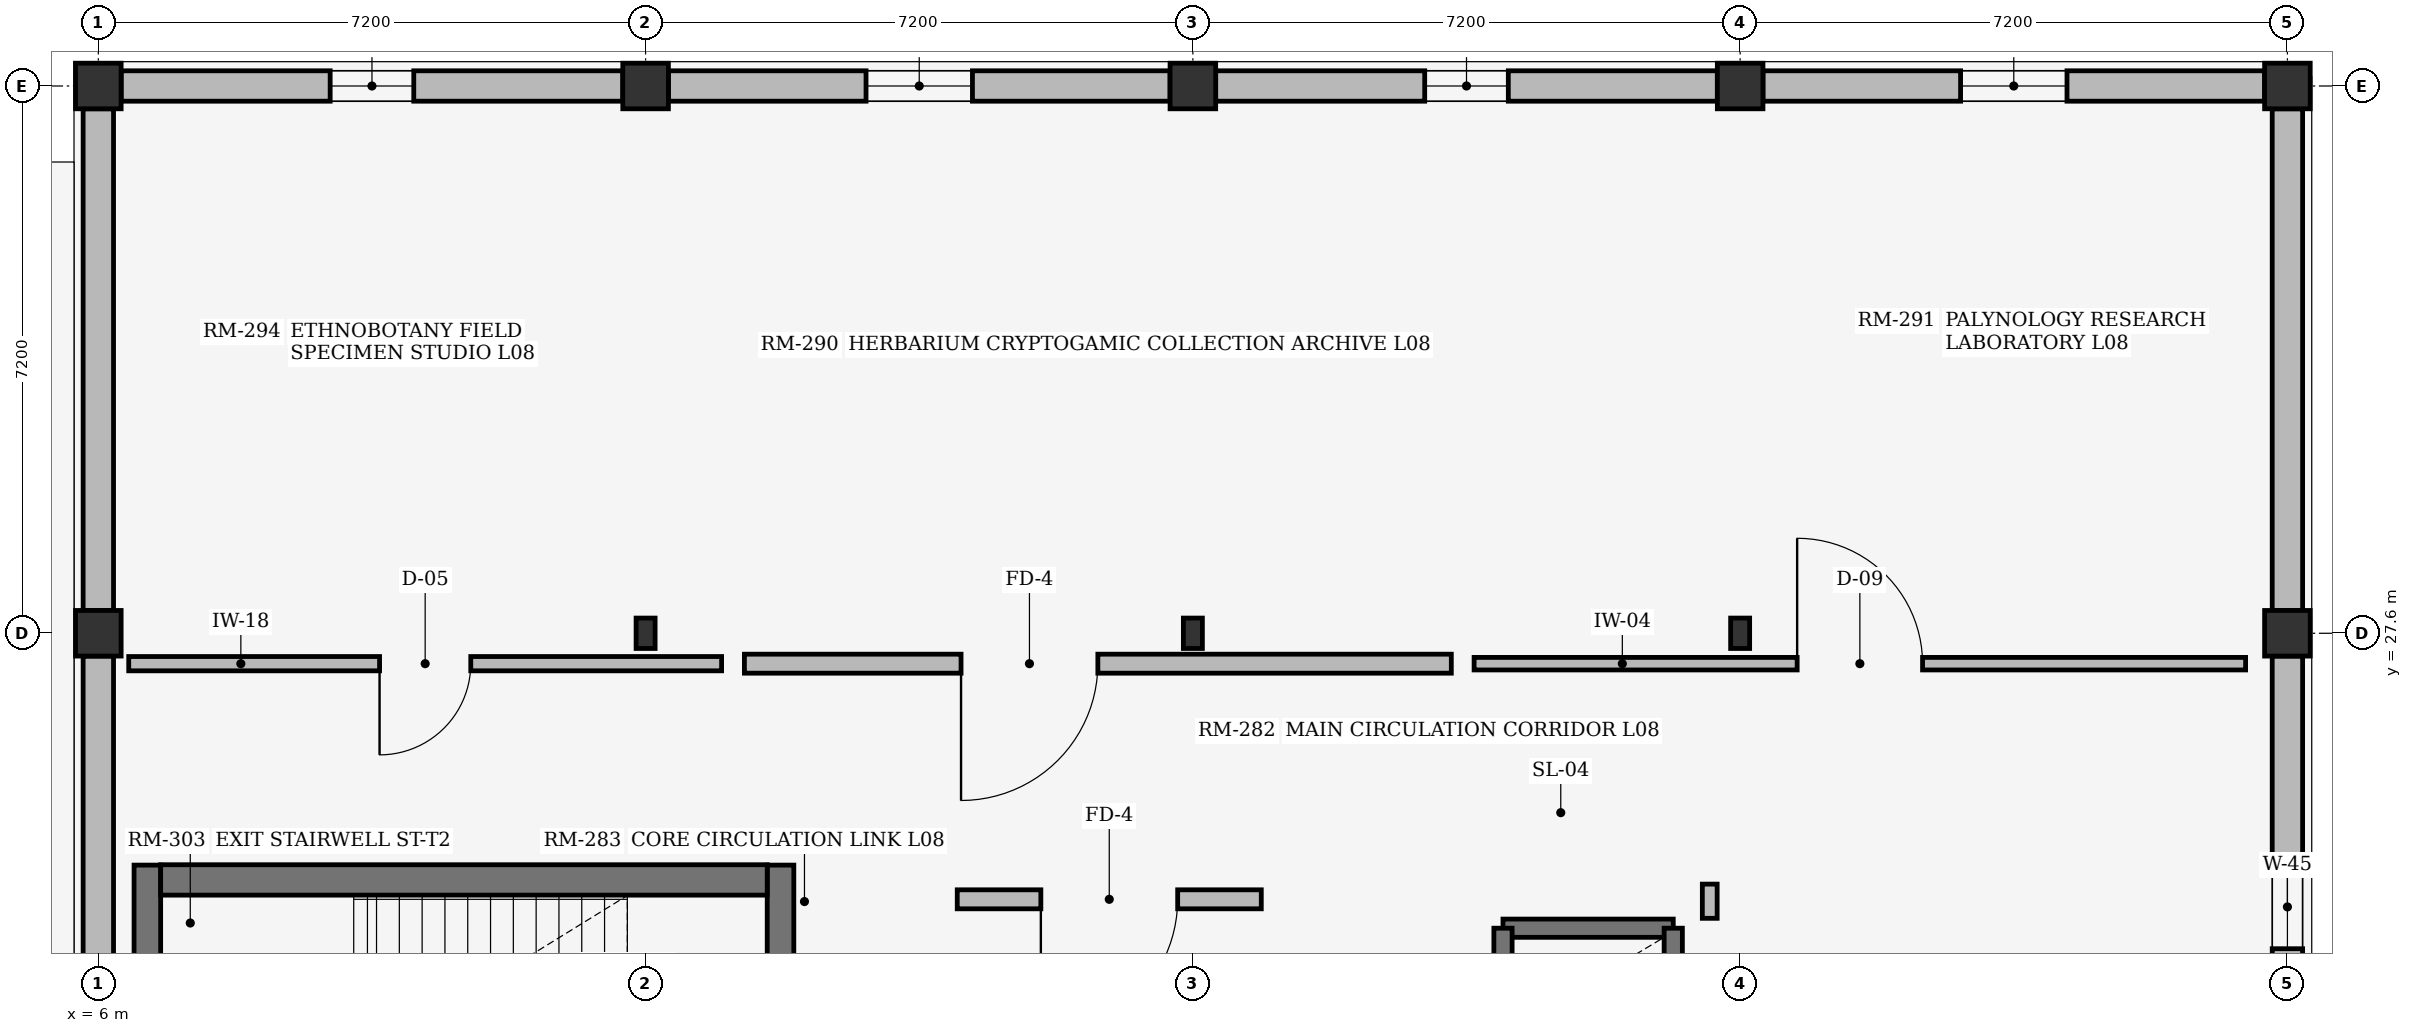
"""IFC4 building model, lengths in metres.
Left out: names, types, materials, properties, quantities, classifications, styles, units other than length and angle.
Written with IfcOpenShell. Run it as: python <this file> out.ifc"""

import sys

from ifc_helpers import new_model, si_unit, direction, frame, frame_2d, origin, origin_2d, place, context, subcontext, project, spatial, rectangle, i_section, extrude, element, fill, save


model = new_model("IFC4")
c1 = context("Model", 3, precision=1e-05, world=origin(), true_north=direction((0.0, 1.0)))
c2 = subcontext(c1, "Body", "Model", "MODEL_VIEW")
j1 = project(units=[si_unit("LENGTHUNIT", "METRE"), si_unit("PLANEANGLEUNIT", "RADIAN")], contexts=[c1])
p1 = place(None, origin())
s1 = spatial("IfcSite", under=j1, at=p1, CompositionType="ELEMENT")
p2 = place(p1, origin())
s2 = spatial("IfcBuilding", under=s1, at=p2, CompositionType="ELEMENT")
p3 = place(p2, frame((0.0, 0.0, 32.7)))
s3 = spatial("IfcBuildingStorey", under=s2, at=p3, CompositionType="ELEMENT", Elevation=32.7)
for number, where, z_axis, x_axis in (
    (1, (6.0, 27.6, 0.0), (0.0, 0.0, 1.0), (1.0, 0.0, 0.0)),
    (2, (6.0, 34.8, 0.0), (0.0, 0.0, 1.0), (1.0, 0.0, 0.0)),
):
    element("IfcColumn", number, at=place(p3, frame(where, z_axis=z_axis, x_axis=x_axis)), inside=s3, PredefinedType="COLUMN", context=c2, shape_type="SweptSolid", body=[
        extrude(rectangle(XDim=0.6, YDim=0.6, at=origin_2d()), origin(), (0.0, 0.0, 1.0), 3.56),
    ])
p4 = place(p3, frame((13.2, 27.6, 0.0), z_axis=(0.0, 0.0, 1.0), x_axis=(1.0, 0.0, 0.0)))
e3 = element("IfcColumn", 3, at=p4, inside=s3, PredefinedType="COLUMN", context=c2, shape_type="SweptSolid", body=[
    extrude(i_section(OverallWidth=0.25, OverallDepth=0.4, WebThickness=0.01, FlangeThickness=0.013, at=origin_2d()), origin(), (0.0, 0.0, 1.0), 3.56),
])
p5 = place(p3, frame((13.2, 34.8, 0.0), z_axis=(0.0, 0.0, 1.0), x_axis=(1.0, 0.0, 0.0)))
e4 = element("IfcColumn", 4, at=p5, inside=s3, PredefinedType="COLUMN", context=c2, shape_type="SweptSolid", body=[
    extrude(rectangle(XDim=0.6, YDim=0.6, at=origin_2d()), origin(), (0.0, 0.0, 1.0), 3.56),
])
p6 = place(p3, frame((20.4, 27.6, 0.0), z_axis=(0.0, 0.0, 1.0), x_axis=(1.0, 0.0, 0.0)))
e5 = element("IfcColumn", 5, at=p6, inside=s3, PredefinedType="COLUMN", context=c2, shape_type="SweptSolid", body=[
    extrude(i_section(OverallWidth=0.25, OverallDepth=0.4, WebThickness=0.01, FlangeThickness=0.013, at=origin_2d()), origin(), (0.0, 0.0, 1.0), 3.56),
])
p7 = place(p3, frame((20.4, 34.8, 0.0), z_axis=(0.0, 0.0, 1.0), x_axis=(1.0, 0.0, 0.0)))
e6 = element("IfcColumn", 6, at=p7, inside=s3, PredefinedType="COLUMN", context=c2, shape_type="SweptSolid", body=[
    extrude(rectangle(XDim=0.6, YDim=0.6, at=origin_2d()), origin(), (0.0, 0.0, 1.0), 3.56),
])
p8 = place(p3, frame((27.6, 27.6, 0.0), z_axis=(0.0, 0.0, 1.0), x_axis=(1.0, 0.0, 0.0)))
e7 = element("IfcColumn", 7, at=p8, inside=s3, PredefinedType="COLUMN", context=c2, shape_type="SweptSolid", body=[
    extrude(i_section(OverallWidth=0.25, OverallDepth=0.4, WebThickness=0.01, FlangeThickness=0.013, at=origin_2d()), origin(), (0.0, 0.0, 1.0), 3.56),
])
for number, where, z_axis, x_axis in (
    (8, (27.6, 34.8, 0.0), (0.0, 0.0, 1.0), (1.0, 0.0, 0.0)),
    (9, (34.8, 27.6, 0.0), (0.0, 0.0, 1.0), (1.0, 0.0, 0.0)),
    (10, (34.8, 34.8, 0.0), (0.0, 0.0, 1.0), (1.0, 0.0, 0.0)),
):
    element("IfcColumn", number, at=place(p3, frame(where, z_axis=z_axis, x_axis=x_axis)), inside=s3, PredefinedType="COLUMN", context=c2, shape_type="SweptSolid", body=[
        extrude(rectangle(XDim=0.6, YDim=0.6, at=origin_2d()), origin(), (0.0, 0.0, 1.0), 3.56),
    ])
p9 = place(p3, frame((6.3, 34.8, 0.0), z_axis=(0.0, 0.0, 1.0), x_axis=(1.0, 0.0, 0.0)))
e11 = element("IfcWall", 11, at=p9, inside=s3, PredefinedType="STANDARD", context=c2, shape_type="SweptSolid", body=[
    extrude(rectangle(XDim=6.6, YDim=0.4, at=frame_2d((3.3, 0.0))), origin(), (0.0, 0.0, 1.0), 3.04),
])
p10 = place(p9, frame((2.75, 0.0, 0.75)))
e12 = element("IfcOpeningElement", 12, at=p10, cuts=e11, PredefinedType="OPENING", context=c2, shape_type="SweptSolid", body=[
    extrude(rectangle(XDim=1.1, YDim=1.25, at=frame_2d((0.55, 0.625))), frame((0.0, 0.21, 0.0), z_axis=(0.0, -1.0, 0.0), x_axis=(1.0, 0.0, 0.0)), (0.0, 0.0, 1.0), 0.42),
])
p11 = place(p3, frame((13.5, 34.8, 0.0), z_axis=(0.0, 0.0, 1.0), x_axis=(1.0, 0.0, 0.0)))
e13 = element("IfcWall", 13, at=p11, inside=s3, PredefinedType="STANDARD", context=c2, shape_type="SweptSolid", body=[
    extrude(rectangle(XDim=6.6, YDim=0.4, at=frame_2d((3.3, 0.0))), origin(), (0.0, 0.0, 1.0), 3.04),
])
p12 = place(p11, frame((2.6, 0.0, 0.75)))
e14 = element("IfcOpeningElement", 14, at=p12, cuts=e13, PredefinedType="OPENING", context=c2, shape_type="SweptSolid", body=[
    extrude(rectangle(XDim=1.4, YDim=1.25, at=frame_2d((0.7, 0.625))), frame((0.0, 0.21, 0.0), z_axis=(0.0, -1.0, 0.0), x_axis=(1.0, 0.0, 0.0)), (0.0, 0.0, 1.0), 0.42),
])
p13 = place(p3, frame((20.7, 34.8, 0.0), z_axis=(0.0, 0.0, 1.0), x_axis=(1.0, 0.0, 0.0)))
e15 = element("IfcWall", 15, at=p13, inside=s3, PredefinedType="STANDARD", context=c2, shape_type="SweptSolid", body=[
    extrude(rectangle(XDim=6.6, YDim=0.4, at=frame_2d((3.3, 0.0))), origin(), (0.0, 0.0, 1.0), 3.04),
])
p14 = place(p13, frame((2.75, 0.0, 0.75)))
e16 = element("IfcOpeningElement", 16, at=p14, cuts=e15, PredefinedType="OPENING", context=c2, shape_type="SweptSolid", body=[
    extrude(rectangle(XDim=1.1, YDim=1.25, at=frame_2d((0.55, 0.625))), frame((0.0, 0.21, 0.0), z_axis=(0.0, -1.0, 0.0), x_axis=(1.0, 0.0, 0.0)), (0.0, 0.0, 1.0), 0.42),
])
p15 = place(p3, frame((27.9, 34.8, 0.0), z_axis=(0.0, 0.0, 1.0), x_axis=(1.0, 0.0, 0.0)))
e17 = element("IfcWall", 17, at=p15, inside=s3, PredefinedType="STANDARD", context=c2, shape_type="SweptSolid", body=[
    extrude(rectangle(XDim=6.6, YDim=0.4, at=frame_2d((3.3, 0.0))), origin(), (0.0, 0.0, 1.0), 3.04),
])
p16 = place(p15, frame((2.6, 0.0, 0.75)))
e18 = element("IfcOpeningElement", 18, at=p16, cuts=e17, PredefinedType="OPENING", context=c2, shape_type="SweptSolid", body=[
    extrude(rectangle(XDim=1.4, YDim=1.25, at=frame_2d((0.7, 0.625))), frame((0.0, 0.21, 0.0), z_axis=(0.0, -1.0, 0.0), x_axis=(1.0, 0.0, 0.0)), (0.0, 0.0, 1.0), 0.42),
])
for number, where, z_axis, x_axis in (
    (19, (6.0, 20.7, 0.0), (0.0, 0.0, 1.0), (0.0, 1.0, 0.0)),
    (20, (6.0, 27.9, 0.0), (0.0, 0.0, 1.0), (0.0, 1.0, 0.0)),
):
    element("IfcWall", number, at=place(p3, frame(where, z_axis=z_axis, x_axis=x_axis)), inside=s3, PredefinedType="STANDARD", context=c2, shape_type="SweptSolid", body=[
        extrude(rectangle(XDim=6.6, YDim=0.4, at=frame_2d((3.3, 0.0))), origin(), (0.0, 0.0, 1.0), 3.04),
    ])
p17 = place(p3, frame((34.8, 20.7, 0.0), z_axis=(0.0, 0.0, 1.0), x_axis=(0.0, 1.0, 0.0)))
e21 = element("IfcWall", 21, at=p17, inside=s3, PredefinedType="STANDARD", context=c2, shape_type="SweptSolid", body=[
    extrude(rectangle(XDim=6.6, YDim=0.4, at=frame_2d((3.3, 0.0))), origin(), (0.0, 0.0, 1.0), 3.04),
])
p18 = place(p17, frame((2.75, 0.0, 0.75)))
e22 = element("IfcOpeningElement", 22, at=p18, cuts=e21, PredefinedType="OPENING", context=c2, shape_type="SweptSolid", body=[
    extrude(rectangle(XDim=1.1, YDim=1.25, at=frame_2d((0.55, 0.625))), frame((0.0, 0.21, 0.0), z_axis=(0.0, -1.0, 0.0), x_axis=(1.0, 0.0, 0.0)), (0.0, 0.0, 1.0), 0.42),
])
p19 = place(p3, frame((34.8, 27.9, 0.0), z_axis=(0.0, 0.0, 1.0), x_axis=(0.0, 1.0, 0.0)))
e23 = element("IfcWall", 23, at=p19, inside=s3, PredefinedType="STANDARD", context=c2, shape_type="SweptSolid", body=[
    extrude(rectangle(XDim=6.6, YDim=0.4, at=frame_2d((3.3, 0.0))), origin(), (0.0, 0.0, 1.0), 3.04),
])
p20 = place(p3, frame((14.975, 24.55, 0.0), z_axis=(0.0, 0.0, 1.0), x_axis=(0.0, -1.0, 0.0)))
e24 = element("IfcWall", 24, at=p20, inside=s3, PredefinedType="SHEAR", context=c2, shape_type="SweptSolid", body=[
    extrude(rectangle(XDim=4.59, YDim=0.35, at=frame_2d((2.295, 0.0))), origin(), (0.0, 0.0, 1.0), 3.56),
])
p21 = place(p20, frame((1.72, 0.0, 0.0)))
e25 = element("IfcOpeningElement", 25, at=p21, cuts=e24, PredefinedType="OPENING", context=c2, shape_type="SweptSolid", body=[
    extrude(rectangle(XDim=1.15, YDim=2.2, at=frame_2d((0.575, 1.1))), frame((0.0, 0.185, 0.0), z_axis=(0.0, -1.0, 0.0), x_axis=(1.0, 0.0, 0.0)), (0.0, 0.0, 1.0), 0.37),
])
p22 = place(p3, frame((6.645, 24.55, 0.0), z_axis=(0.0, 0.0, 1.0), x_axis=(0.0, -1.0, 0.0)))
e26 = element("IfcWall", 26, at=p22, inside=s3, PredefinedType="SHEAR", context=c2, shape_type="SweptSolid", body=[
    extrude(rectangle(XDim=4.59, YDim=0.35, at=frame_2d((2.295, 0.0))), origin(), (0.0, 0.0, 1.0), 3.56),
])
p23 = place(p3, frame((14.8, 24.355, 0.0), z_axis=(0.0, 0.0, 1.0), x_axis=(-1.0, 0.0, 0.0)))
e27 = element("IfcWall", 27, at=p23, inside=s3, PredefinedType="SHEAR", context=c2, shape_type="SweptSolid", body=[
    extrude(rectangle(XDim=7.98, YDim=0.4, at=frame_2d((3.99, 0.0))), origin(), (0.0, 0.0, 1.0), 3.56),
])
p24 = place(p3, frame((24.48, 23.72, 0.0), z_axis=(0.0, 0.0, 1.0), x_axis=(1.0, 0.0, 0.0)))
e28 = element("IfcWall", 28, at=p24, inside=s3, PredefinedType="SHEAR", context=c2, shape_type="SweptSolid", body=[
    extrude(rectangle(XDim=2.24, YDim=0.24, at=frame_2d((1.12, 0.0))), origin(), (0.0, 0.0, 1.0), 3.56),
])
for number, where, z_axis, x_axis in (
    (29, (24.48, 20.78, 0.0), (0.0, 0.0, 1.0), (0.0, 1.0, 0.0)),
    (30, (26.72, 20.78, 0.0), (0.0, 0.0, 1.0), (0.0, 1.0, 0.0)),
):
    element("IfcWall", number, at=place(p3, frame(where, z_axis=z_axis, x_axis=x_axis)), inside=s3, PredefinedType="SHEAR", context=c2, shape_type="SweptSolid", body=[
        extrude(rectangle(XDim=2.94, YDim=0.24, at=frame_2d((1.47, 0.0))), origin(), (0.0, 0.0, 1.0), 3.56),
    ])
p25 = place(p3, frame((17.3, 24.1, 0.0), z_axis=(0.0, 0.0, 1.0), x_axis=(1.0, 0.0, 0.0)))
e31 = element("IfcWall", 31, at=p25, inside=s3, PredefinedType="SOLIDWALL", context=c2, shape_type="SweptSolid", body=[
    extrude(rectangle(XDim=4.0, YDim=0.25, at=frame_2d((2.0, 0.0))), origin(), (0.0, 0.0, 1.0), 3.54),
])
p26 = place(p25, frame((1.1, 0.0, 0.0)))
e32 = element("IfcOpeningElement", 32, at=p26, cuts=e31, PredefinedType="OPENING", context=c2, shape_type="SweptSolid", body=[
    extrude(rectangle(XDim=1.8, YDim=2.25, at=frame_2d((0.9, 1.125))), frame((0.0, 0.135, 0.0), z_axis=(0.0, -1.0, 0.0), x_axis=(1.0, 0.0, 0.0)), (0.0, 0.0, 1.0), 0.27),
])
p27 = place(p3, frame((6.4, 27.2, 0.0), z_axis=(0.0, 0.0, 1.0), x_axis=(1.0, 0.0, 0.0)))
e33 = element("IfcWall", 33, at=p27, inside=s3, PredefinedType="PARTITIONING", context=c2, shape_type="SweptSolid", body=[
    extrude(rectangle(XDim=7.8, YDim=0.188, at=frame_2d((3.9, 0.0))), origin(), (0.0, 0.0, 1.0), 3.54),
])
p28 = place(p27, frame((3.3, 0.0, 0.0)))
e34 = element("IfcOpeningElement", 34, at=p28, cuts=e33, PredefinedType="OPENING", context=c2, shape_type="SweptSolid", body=[
    extrude(rectangle(XDim=1.2, YDim=2.2, at=frame_2d((0.6, 1.1))), frame((0.0, 0.104, 0.0), z_axis=(0.0, -1.0, 0.0), x_axis=(1.0, 0.0, 0.0)), (0.0, 0.0, 1.0), 0.208),
])
p29 = place(p3, frame((27.2, 24.3, 0.0), z_axis=(0.0, 0.0, 1.0), x_axis=(0.0, -1.0, 0.0)))
e35 = element("IfcWall", 35, at=p29, inside=s3, PredefinedType="PARTITIONING", context=c2, shape_type="SweptSolid", body=[
    extrude(rectangle(XDim=0.45, YDim=0.195, at=frame_2d((0.225, 0.0))), origin(), (0.0, 0.0, 1.0), 3.54),
])
p30 = place(p3, frame((14.5, 27.2, 0.0), z_axis=(0.0, 0.0, 1.0), x_axis=(1.0, 0.0, 0.0)))
e36 = element("IfcWall", 36, at=p30, inside=s3, PredefinedType="SOLIDWALL", context=c2, shape_type="SweptSolid", body=[
    extrude(rectangle(XDim=9.3, YDim=0.25, at=frame_2d((4.65, 0.0))), origin(), (0.0, 0.0, 1.0), 3.54),
])
p31 = place(p30, frame((2.85, 0.0, 0.0)))
e37 = element("IfcOpeningElement", 37, at=p31, cuts=e36, PredefinedType="OPENING", context=c2, shape_type="SweptSolid", body=[
    extrude(rectangle(XDim=1.8, YDim=2.25, at=frame_2d((0.9, 1.125))), frame((0.0, 0.135, 0.0), z_axis=(0.0, -1.0, 0.0), x_axis=(1.0, 0.0, 0.0)), (0.0, 0.0, 1.0), 0.27),
])
p32 = place(p3, frame((24.1, 27.2, 0.0), z_axis=(0.0, 0.0, 1.0), x_axis=(1.0, 0.0, 0.0)))
e38 = element("IfcWall", 38, at=p32, inside=s3, PredefinedType="PARTITIONING", context=c2, shape_type="SweptSolid", body=[
    extrude(rectangle(XDim=10.15, YDim=0.165, at=frame_2d((5.075, 0.0))), origin(), (0.0, 0.0, 1.0), 3.54),
])
p33 = place(p32, frame((4.25, 0.0, 0.0)))
e39 = element("IfcOpeningElement", 39, at=p33, cuts=e38, PredefinedType="OPENING", context=c2, shape_type="SweptSolid", body=[
    extrude(rectangle(XDim=1.65, YDim=2.25, at=frame_2d((0.825, 1.125))), frame((0.0, 0.093, 0.0), z_axis=(0.0, -1.0, 0.0), x_axis=(1.0, 0.0, 0.0)), (0.0, 0.0, 1.0), 0.185),
])
p34 = place(p10, origin())
e40 = element("IfcWindow", 40, at=p34, inside=s3, PartitioningType="SINGLE_PANEL", PredefinedType="WINDOW", context=c2, shape_type="SweptSolid", body=[
    extrude(rectangle(XDim=1.1, YDim=1.25, at=frame_2d((0.55, 0.625))), frame((0.0, 0.03, 0.0), z_axis=(0.0, -1.0, 0.0), x_axis=(1.0, 0.0, 0.0)), (0.0, 0.0, 1.0), 0.06),
])
fill(e12, e40)
p35 = place(p12, origin())
e41 = element("IfcWindow", 41, at=p35, inside=s3, PartitioningType="SINGLE_PANEL", PredefinedType="WINDOW", context=c2, shape_type="SweptSolid", body=[
    extrude(rectangle(XDim=1.4, YDim=1.25, at=frame_2d((0.7, 0.625))), frame((0.0, 0.03, 0.0), z_axis=(0.0, -1.0, 0.0), x_axis=(1.0, 0.0, 0.0)), (0.0, 0.0, 1.0), 0.06),
])
fill(e14, e41)
p36 = place(p14, origin())
e42 = element("IfcWindow", 42, at=p36, inside=s3, PartitioningType="SINGLE_PANEL", PredefinedType="WINDOW", context=c2, shape_type="SweptSolid", body=[
    extrude(rectangle(XDim=1.1, YDim=1.25, at=frame_2d((0.55, 0.625))), frame((0.0, 0.03, 0.0), z_axis=(0.0, -1.0, 0.0), x_axis=(1.0, 0.0, 0.0)), (0.0, 0.0, 1.0), 0.06),
])
fill(e16, e42)
p37 = place(p16, origin())
e43 = element("IfcWindow", 43, at=p37, inside=s3, PartitioningType="SINGLE_PANEL", PredefinedType="WINDOW", context=c2, shape_type="SweptSolid", body=[
    extrude(rectangle(XDim=1.4, YDim=1.25, at=frame_2d((0.7, 0.625))), frame((0.0, 0.03, 0.0), z_axis=(0.0, -1.0, 0.0), x_axis=(1.0, 0.0, 0.0)), (0.0, 0.0, 1.0), 0.06),
])
fill(e18, e43)
p38 = place(p18, origin())
e44 = element("IfcWindow", 44, at=p38, inside=s3, PartitioningType="SINGLE_PANEL", PredefinedType="WINDOW", context=c2, shape_type="SweptSolid", body=[
    extrude(rectangle(XDim=1.1, YDim=1.25, at=frame_2d((0.55, 0.625))), frame((0.0, 0.03, 0.0), z_axis=(0.0, -1.0, 0.0), x_axis=(1.0, 0.0, 0.0)), (0.0, 0.0, 1.0), 0.06),
])
fill(e22, e44)
p39 = place(p26, frame((1.8, 0.0, 0.0), z_axis=(0.0, 0.0, 1.0), x_axis=(-1.0, 0.0, 0.0)))
e45 = element("IfcDoor", 45, at=p39, inside=s3, OperationType="DOUBLE_DOOR_SINGLE_SWING", PredefinedType="DOOR", context=c2, shape_type="SweptSolid", body=[
    extrude(rectangle(XDim=1.8, YDim=2.25, at=frame_2d((0.9, 1.125))), frame((0.0, 0.025, 0.0), z_axis=(0.0, -1.0, 0.0), x_axis=(1.0, 0.0, 0.0)), (0.0, 0.0, 1.0), 0.05),
])
fill(e32, e45)
p40 = place(p28, frame((1.2, 0.0, 0.0), z_axis=(0.0, 0.0, 1.0), x_axis=(-1.0, 0.0, 0.0)))
e46 = element("IfcDoor", 46, at=p40, inside=s3, OperationType="SINGLE_SWING_LEFT", PredefinedType="DOOR", context=c2, shape_type="SweptSolid", body=[
    extrude(rectangle(XDim=1.2, YDim=2.2, at=frame_2d((0.6, 1.1))), frame((0.0, 0.025, 0.0), z_axis=(0.0, -1.0, 0.0), x_axis=(1.0, 0.0, 0.0)), (0.0, 0.0, 1.0), 0.05),
])
fill(e34, e46)
p41 = place(p31, frame((1.8, 0.0, 0.0), z_axis=(0.0, 0.0, 1.0), x_axis=(-1.0, 0.0, 0.0)))
e47 = element("IfcDoor", 47, at=p41, inside=s3, OperationType="DOUBLE_DOOR_SINGLE_SWING", PredefinedType="DOOR", context=c2, shape_type="SweptSolid", body=[
    extrude(rectangle(XDim=1.8, YDim=2.25, at=frame_2d((0.9, 1.125))), frame((0.0, 0.025, 0.0), z_axis=(0.0, -1.0, 0.0), x_axis=(1.0, 0.0, 0.0)), (0.0, 0.0, 1.0), 0.05),
])
fill(e37, e47)
p42 = place(p33, origin())
e48 = element("IfcDoor", 48, at=p42, inside=s3, OperationType="DOUBLE_DOOR_SINGLE_SWING", PredefinedType="DOOR", context=c2, shape_type="SweptSolid", body=[
    extrude(rectangle(XDim=1.65, YDim=2.25, at=frame_2d((0.825, 1.125))), frame((0.0, 0.025, 0.0), z_axis=(0.0, -1.0, 0.0), x_axis=(1.0, 0.0, 0.0)), (0.0, 0.0, 1.0), 0.05),
])
fill(e39, e48)
save(model, sys.argv[1])
